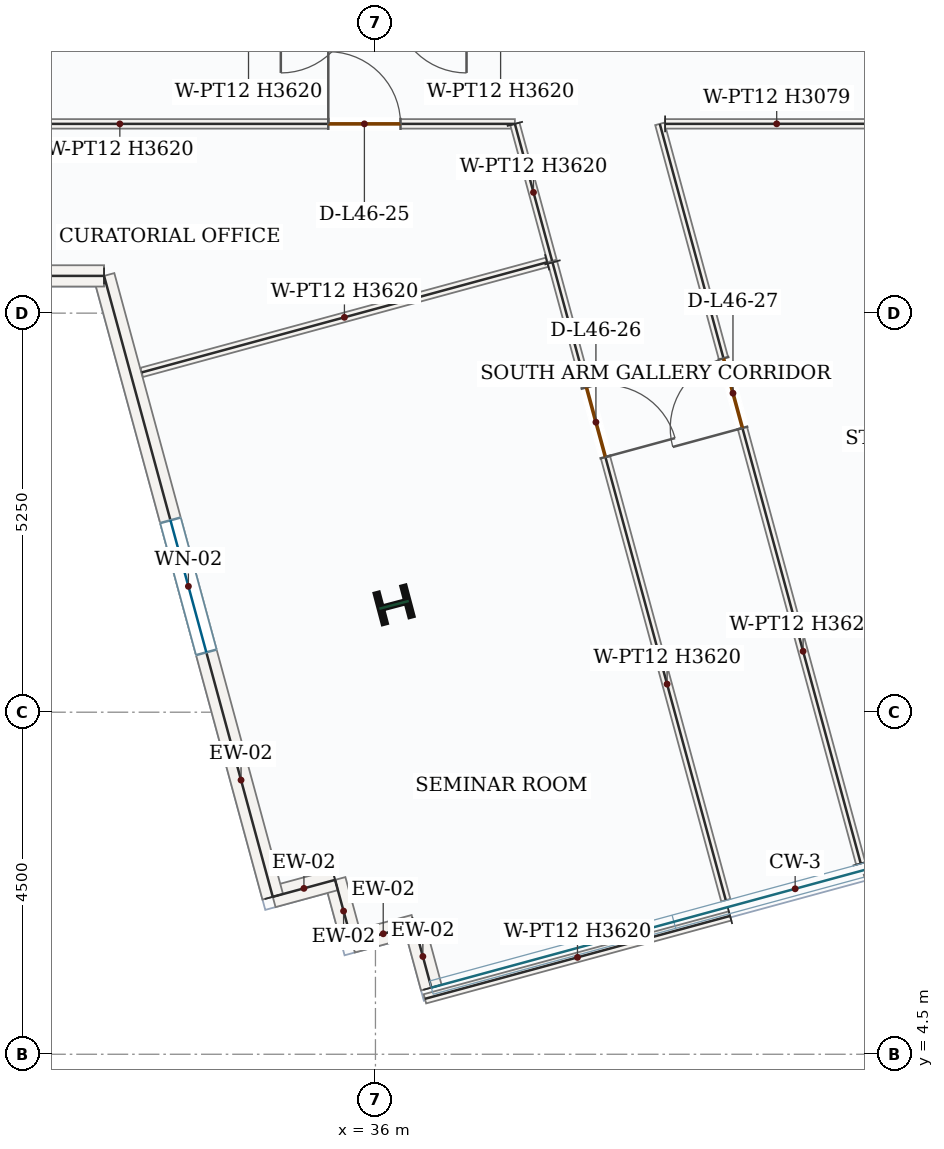
"""IFC4 building model, lengths in metres.
Left out: names, types, materials, properties, quantities, classifications, styles, units other than length and angle.
Written with IfcOpenShell. Run it as: python <this file> out.ifc"""

import sys

from ifc_helpers import new_model, si_unit, direction, frame, frame_2d, origin, origin_2d, place, context, subcontext, project, spatial, rectangle, i_section, extrude, source, transform, mapped, element, fill, save


model = new_model("IFC4")
c1 = context("Model", 3, precision=1e-05, world=origin(), true_north=direction((0.0, 1.0)))
c2 = subcontext(c1, "Body", "Model", "MODEL_VIEW")
j1 = project(units=[si_unit("LENGTHUNIT", "METRE"), si_unit("PLANEANGLEUNIT", "RADIAN")], contexts=[c1])
p1 = place(None, origin())
s1 = spatial("IfcSite", under=j1, at=p1, CompositionType="ELEMENT")
p2 = place(p1, origin())
s2 = spatial("IfcBuilding", under=s1, at=p2, CompositionType="ELEMENT")
p3 = place(p2, frame((0.0, 0.0, 198.0)))
s3 = spatial("IfcBuildingStorey", under=s2, at=p3, CompositionType="ELEMENT", Elevation=198.0)
m1 = source(origin(), c2, "Body", "SweptSolid", [
    extrude(i_section(OverallWidth=0.404, OverallDepth=0.407, WebThickness=0.027, FlangeThickness=0.044, FilletRadius=0.018, at=origin_2d()), origin(), (0.0, 0.0, 1.0), 3.9),
])
p4 = place(p3, frame((36.245, 10.412, 0.0), z_axis=(0.0, 0.0, 1.0), x_axis=(-0.255445757936, 0.966823388604, 0.0)))
e1 = element("IfcColumn", 1, at=p4, inside=s3, PredefinedType="COLUMN", context=c2, shape_type="MappedRepresentation", body=[
    mapped(m1, transform((0.0, 0.0, 0.0), x_axis=(1.0, 0.0, 0.0), y_axis=(0.0, 1.0, 0.0), z_axis=(0.0, 0.0, 1.0), scale=1.0)),
])
m2 = source(origin(), c2, "Body", "SweptSolid", [
    extrude(rectangle(XDim=0.85, YDim=0.28, at=frame_2d((0.425, 0.0))), origin(), (0.0, 0.0, 1.0), 3.62),
])
for number, where, z_axis, x_axis in (
    (2, (36.735, 5.376, 0.0), (0.0, 0.0, 1.0), (-0.262, 0.965, 0.0)),
    (3, (36.512, 6.197, 0.0), (0.0, 0.0, 1.0), (-0.965, -0.262, 0.0)),
    (4, (35.692, 5.974, 0.0), (0.0, 0.0, 1.0), (-0.262, 0.965, 0.0)),
    (5, (35.469, 6.794, 0.0), (0.0, 0.0, 1.0), (-0.965, -0.262, 0.0)),
):
    element("IfcWall", number, at=place(p3, frame(where, z_axis=z_axis, x_axis=x_axis)), inside=s3, PredefinedType="SOLIDWALL", context=c2, shape_type="MappedRepresentation", body=[
        mapped(m2, transform((0.0, 0.0, 0.0), x_axis=(1.0, 0.0, 0.0), y_axis=(0.0, 1.0, 0.0), z_axis=(0.0, 0.0, 1.0), scale=1.0)),
    ])
p5 = place(p3, frame((34.649, 6.571, 0.0), z_axis=(0.0, 0.0, 1.0), x_axis=(-0.262192380254, 0.965015624608, 0.0)))
e6 = element("IfcWall", 6, at=p5, inside=s3, PredefinedType="SOLIDWALL", context=c2, shape_type="SweptSolid", body=[
    extrude(rectangle(XDim=8.465, YDim=0.28, at=frame_2d((4.232, 0.0))), origin(), (0.0, 0.0, 1.0), 3.62),
])
p6 = place(p5, frame((3.333, 0.0, 0.85)))
e7 = element("IfcOpeningElement", 7, at=p6, cuts=e6, PredefinedType="OPENING", context=c2, shape_type="SweptSolid", body=[
    extrude(rectangle(XDim=1.8, YDim=1.75, at=frame_2d((0.9, 0.875))), frame((0.0, 0.15, 0.0), z_axis=(0.0, -1.0, 0.0), x_axis=(1.0, 0.0, 0.0)), (0.0, 0.0, 1.0), 0.3),
])
p7 = place(p3, frame((32.429, 14.74, 0.0), z_axis=(0.0, 0.0, 1.0), x_axis=(-1.0, 0.0, 0.0)))
e8 = element("IfcWall", 8, at=p7, inside=s3, PredefinedType="SOLIDWALL", context=c2, shape_type="SweptSolid", body=[
    extrude(rectangle(XDim=9.771, YDim=0.28, at=frame_2d((4.886, 0.0))), origin(), (0.0, 0.0, 1.0), 3.62),
])
p8 = place(p7, frame((3.986, 0.0, 0.85)))
e9 = element("IfcOpeningElement", 9, at=p8, cuts=e8, PredefinedType="OPENING", context=c2, shape_type="SweptSolid", body=[
    extrude(rectangle(XDim=1.8, YDim=1.75, at=frame_2d((0.9, 0.875))), frame((0.0, 0.15, 0.0), z_axis=(0.0, -1.0, 0.0), x_axis=(1.0, 0.0, 0.0)), (0.0, 0.0, 1.0), 0.3),
])
p9 = place(p3, frame((30.045, 16.74, 0.0), z_axis=(0.0, 0.0, 1.0), x_axis=(1.0, 0.0, 0.0)))
e10 = element("IfcWall", 10, at=p9, inside=s3, PredefinedType="PARTITIONING", context=c2, shape_type="SweptSolid", body=[
    extrude(rectangle(XDim=7.79, YDim=0.125, at=frame_2d((3.895, 0.0))), origin(), (0.0, 0.0, 1.0), 3.62),
])
p10 = place(p9, frame((5.335, 0.0, 0.0)))
e11 = element("IfcOpeningElement", 11, at=p10, cuts=e10, PredefinedType="OPENING", context=c2, shape_type="SweptSolid", body=[
    extrude(rectangle(XDim=0.95, YDim=2.15, at=frame_2d((0.475, 1.075))), frame((0.0, 0.073, 0.0), z_axis=(0.0, -1.0, 0.0), x_axis=(1.0, 0.0, 0.0)), (0.0, 0.0, 1.0), 0.145),
])
m3 = source(origin(), c2, "Body", "SweptSolid", [
    extrude(rectangle(XDim=1.868, YDim=0.125, at=frame_2d((0.934, 0.0))), origin(), (0.0, 0.0, 1.0), 3.62),
])
p11 = place(p3, frame((37.834, 16.74, 0.0), z_axis=(0.0, 0.0, 1.0), x_axis=(0.262166249224, -0.965022723964, 0.0)))
e12 = element("IfcWall", 12, at=p11, inside=s3, PredefinedType="PARTITIONING", context=c2, shape_type="MappedRepresentation", body=[
    mapped(m3, transform((0.0, 0.0, 0.0), x_axis=(1.0, 0.0, 0.0), y_axis=(0.0, 1.0, 0.0), z_axis=(0.0, 0.0, 1.0), scale=1.0)),
])
m4 = source(origin(), c2, "Body", "SweptSolid", [
    extrude(rectangle(XDim=5.527, YDim=0.125, at=frame_2d((2.764, 0.0))), origin(), (0.0, 0.0, 1.0), 3.62),
])
p12 = place(p3, frame((38.259, 14.92, 0.0), z_axis=(0.0, 0.0, 1.0), x_axis=(-0.965004985248, -0.262231535949, 0.0)))
e13 = element("IfcWall", 13, at=p12, inside=s3, PredefinedType="PARTITIONING", context=c2, shape_type="MappedRepresentation", body=[
    mapped(m4, transform((0.0, 0.0, 0.0), x_axis=(1.0, 0.0, 0.0), y_axis=(0.0, 1.0, 0.0), z_axis=(0.0, 0.0, 1.0), scale=1.0)),
])
p13 = place(p3, frame((38.329, 14.918, 0.0), z_axis=(0.0, 0.0, 1.0), x_axis=(0.262166936223, -0.965022537328, 0.0)))
e14 = element("IfcWall", 14, at=p13, inside=s3, PredefinedType="PARTITIONING", context=c2, shape_type="SweptSolid", body=[
    extrude(rectangle(XDim=8.695, YDim=0.125, at=frame_2d((4.348, 0.0))), origin(), (0.0, 0.0, 1.0), 3.62),
])
p14 = place(p13, frame((1.704, 0.0, 0.0)))
e15 = element("IfcOpeningElement", 15, at=p14, cuts=e14, PredefinedType="OPENING", context=c2, shape_type="SweptSolid", body=[
    extrude(rectangle(XDim=0.95, YDim=2.15, at=frame_2d((0.475, 1.075))), frame((0.0, 0.073, 0.0), z_axis=(0.0, -1.0, 0.0), x_axis=(1.0, 0.0, 0.0)), (0.0, 0.0, 1.0), 0.145),
])
m5 = source(origin(), c2, "Body", "SweptSolid", [
    extrude(rectangle(XDim=4.16, YDim=0.125, at=frame_2d((2.08, 0.0))), origin(), (0.0, 0.0, 1.0), 3.62),
])
p15 = place(p3, frame((40.665, 6.32, 0.0), z_axis=(0.0, 0.0, 1.0), x_axis=(-0.965023387541, -0.262163806614, 0.0)))
e16 = element("IfcWall", 16, at=p15, inside=s3, PredefinedType="PARTITIONING", context=c2, shape_type="MappedRepresentation", body=[
    mapped(m5, transform((0.0, 0.0, 0.0), x_axis=(1.0, 0.0, 0.0), y_axis=(0.0, 1.0, 0.0), z_axis=(0.0, 0.0, 1.0), scale=1.0)),
])
p16 = place(p3, frame((42.385, 7.01, 0.0), z_axis=(0.0, 0.0, 1.0), x_axis=(-0.262203523108, 0.965012597052, 0.0)))
e17 = element("IfcWall", 17, at=p16, inside=s3, PredefinedType="PARTITIONING", context=c2, shape_type="SweptSolid", body=[
    extrude(rectangle(XDim=10.083, YDim=0.125, at=frame_2d((5.042, 0.0))), origin(), (0.0, 0.0, 1.0), 3.62),
])
p17 = place(p16, frame((5.937, 0.0, 0.0)))
e18 = element("IfcOpeningElement", 18, at=p17, cuts=e17, PredefinedType="OPENING", context=c2, shape_type="SweptSolid", body=[
    extrude(rectangle(XDim=0.95, YDim=2.15, at=frame_2d((0.475, 1.075))), frame((0.0, 0.073, 0.0), z_axis=(0.0, -1.0, 0.0), x_axis=(1.0, 0.0, 0.0)), (0.0, 0.0, 1.0), 0.145),
])
m6 = source(origin(), c2, "Body", "SweptSolid", [
    extrude(rectangle(XDim=2.936, YDim=0.125, at=frame_2d((1.468, 0.0))), origin(), (0.0, 0.0, 1.0), 3.079),
])
p18 = place(p3, frame((39.811, 16.74, 0.0), z_axis=(0.0, 0.0, 1.0), x_axis=(0.999999913555, 0.00041580038, 0.0)))
e19 = element("IfcWall", 19, at=p18, inside=s3, PredefinedType="PARTITIONING", context=c2, shape_type="MappedRepresentation", body=[
    mapped(m6, transform((0.0, 0.0, 0.0), x_axis=(1.0, 0.0, 0.0), y_axis=(0.0, 1.0, 0.0), z_axis=(0.0, 0.0, 1.0), scale=1.0)),
])
p19 = place(p3, frame((46.455, 7.893, 0.0), z_axis=(0.0, 0.0, 1.0), x_axis=(-0.965023387541, -0.262163806614, 0.0)))
e20 = element("IfcWall", 20, at=p19, inside=s3, PredefinedType="PARTITIONING", context=c2, shape_type="MappedRepresentation", body=[
    mapped(m5, transform((0.0, 0.0, 0.0), x_axis=(1.0, 0.0, 0.0), y_axis=(0.0, 1.0, 0.0), z_axis=(0.0, 0.0, 1.0), scale=1.0)),
])
m7 = source(origin(), c2, "Body", "SweptSolid", [
    extrude(rectangle(XDim=1.8, YDim=1.75, at=frame_2d((0.9, 0.875))), frame((0.0, 0.03, 0.0), z_axis=(0.0, -1.0, 0.0), x_axis=(1.0, 0.0, 0.0)), (0.0, 0.0, 1.0), 0.06),
])
p20 = place(p6, origin())
e21 = element("IfcWindow", 21, at=p20, inside=s3, PartitioningType="DOUBLE_PANEL_VERTICAL", PredefinedType="WINDOW", context=c2, shape_type="MappedRepresentation", body=[
    mapped(m7, transform((0.0, 0.0, 0.0), x_axis=(1.0, 0.0, 0.0), y_axis=(0.0, 1.0, 0.0), z_axis=(0.0, 0.0, 1.0), scale=1.0)),
])
fill(e7, e21)
m8 = source(origin(), c2, "Body", "SweptSolid", [
    extrude(rectangle(XDim=0.95, YDim=2.15, at=frame_2d((0.475, 1.075))), frame((0.0, 0.025, 0.0), z_axis=(0.0, -1.0, 0.0), x_axis=(1.0, 0.0, 0.0)), (0.0, 0.0, 1.0), 0.05),
])
p21 = place(p10, origin())
e22 = element("IfcDoor", 22, at=p21, inside=s3, OperationType="SINGLE_SWING_LEFT", PredefinedType="DOOR", context=c2, shape_type="MappedRepresentation", body=[
    mapped(m8, transform((0.0, 0.0, 0.0), x_axis=(1.0, 0.0, 0.0), y_axis=(0.0, 1.0, 0.0), z_axis=(0.0, 0.0, 1.0), scale=1.0)),
])
fill(e11, e22)
p22 = place(p14, origin())
e23 = element("IfcDoor", 23, at=p22, inside=s3, OperationType="SINGLE_SWING_RIGHT", PredefinedType="DOOR", context=c2, shape_type="MappedRepresentation", body=[
    mapped(m8, transform((0.0, 0.0, 0.0), x_axis=(1.0, 0.0, 0.0), y_axis=(0.0, 1.0, 0.0), z_axis=(0.0, 0.0, 1.0), scale=1.0)),
])
fill(e15, e23)
p23 = place(p17, origin())
e24 = element("IfcDoor", 24, at=p23, inside=s3, OperationType="SINGLE_SWING_LEFT", PredefinedType="DOOR", context=c2, shape_type="MappedRepresentation", body=[
    mapped(m8, transform((0.0, 0.0, 0.0), x_axis=(1.0, 0.0, 0.0), y_axis=(0.0, 1.0, 0.0), z_axis=(0.0, 0.0, 1.0), scale=1.0)),
])
fill(e18, e24)
save(model, sys.argv[1])
